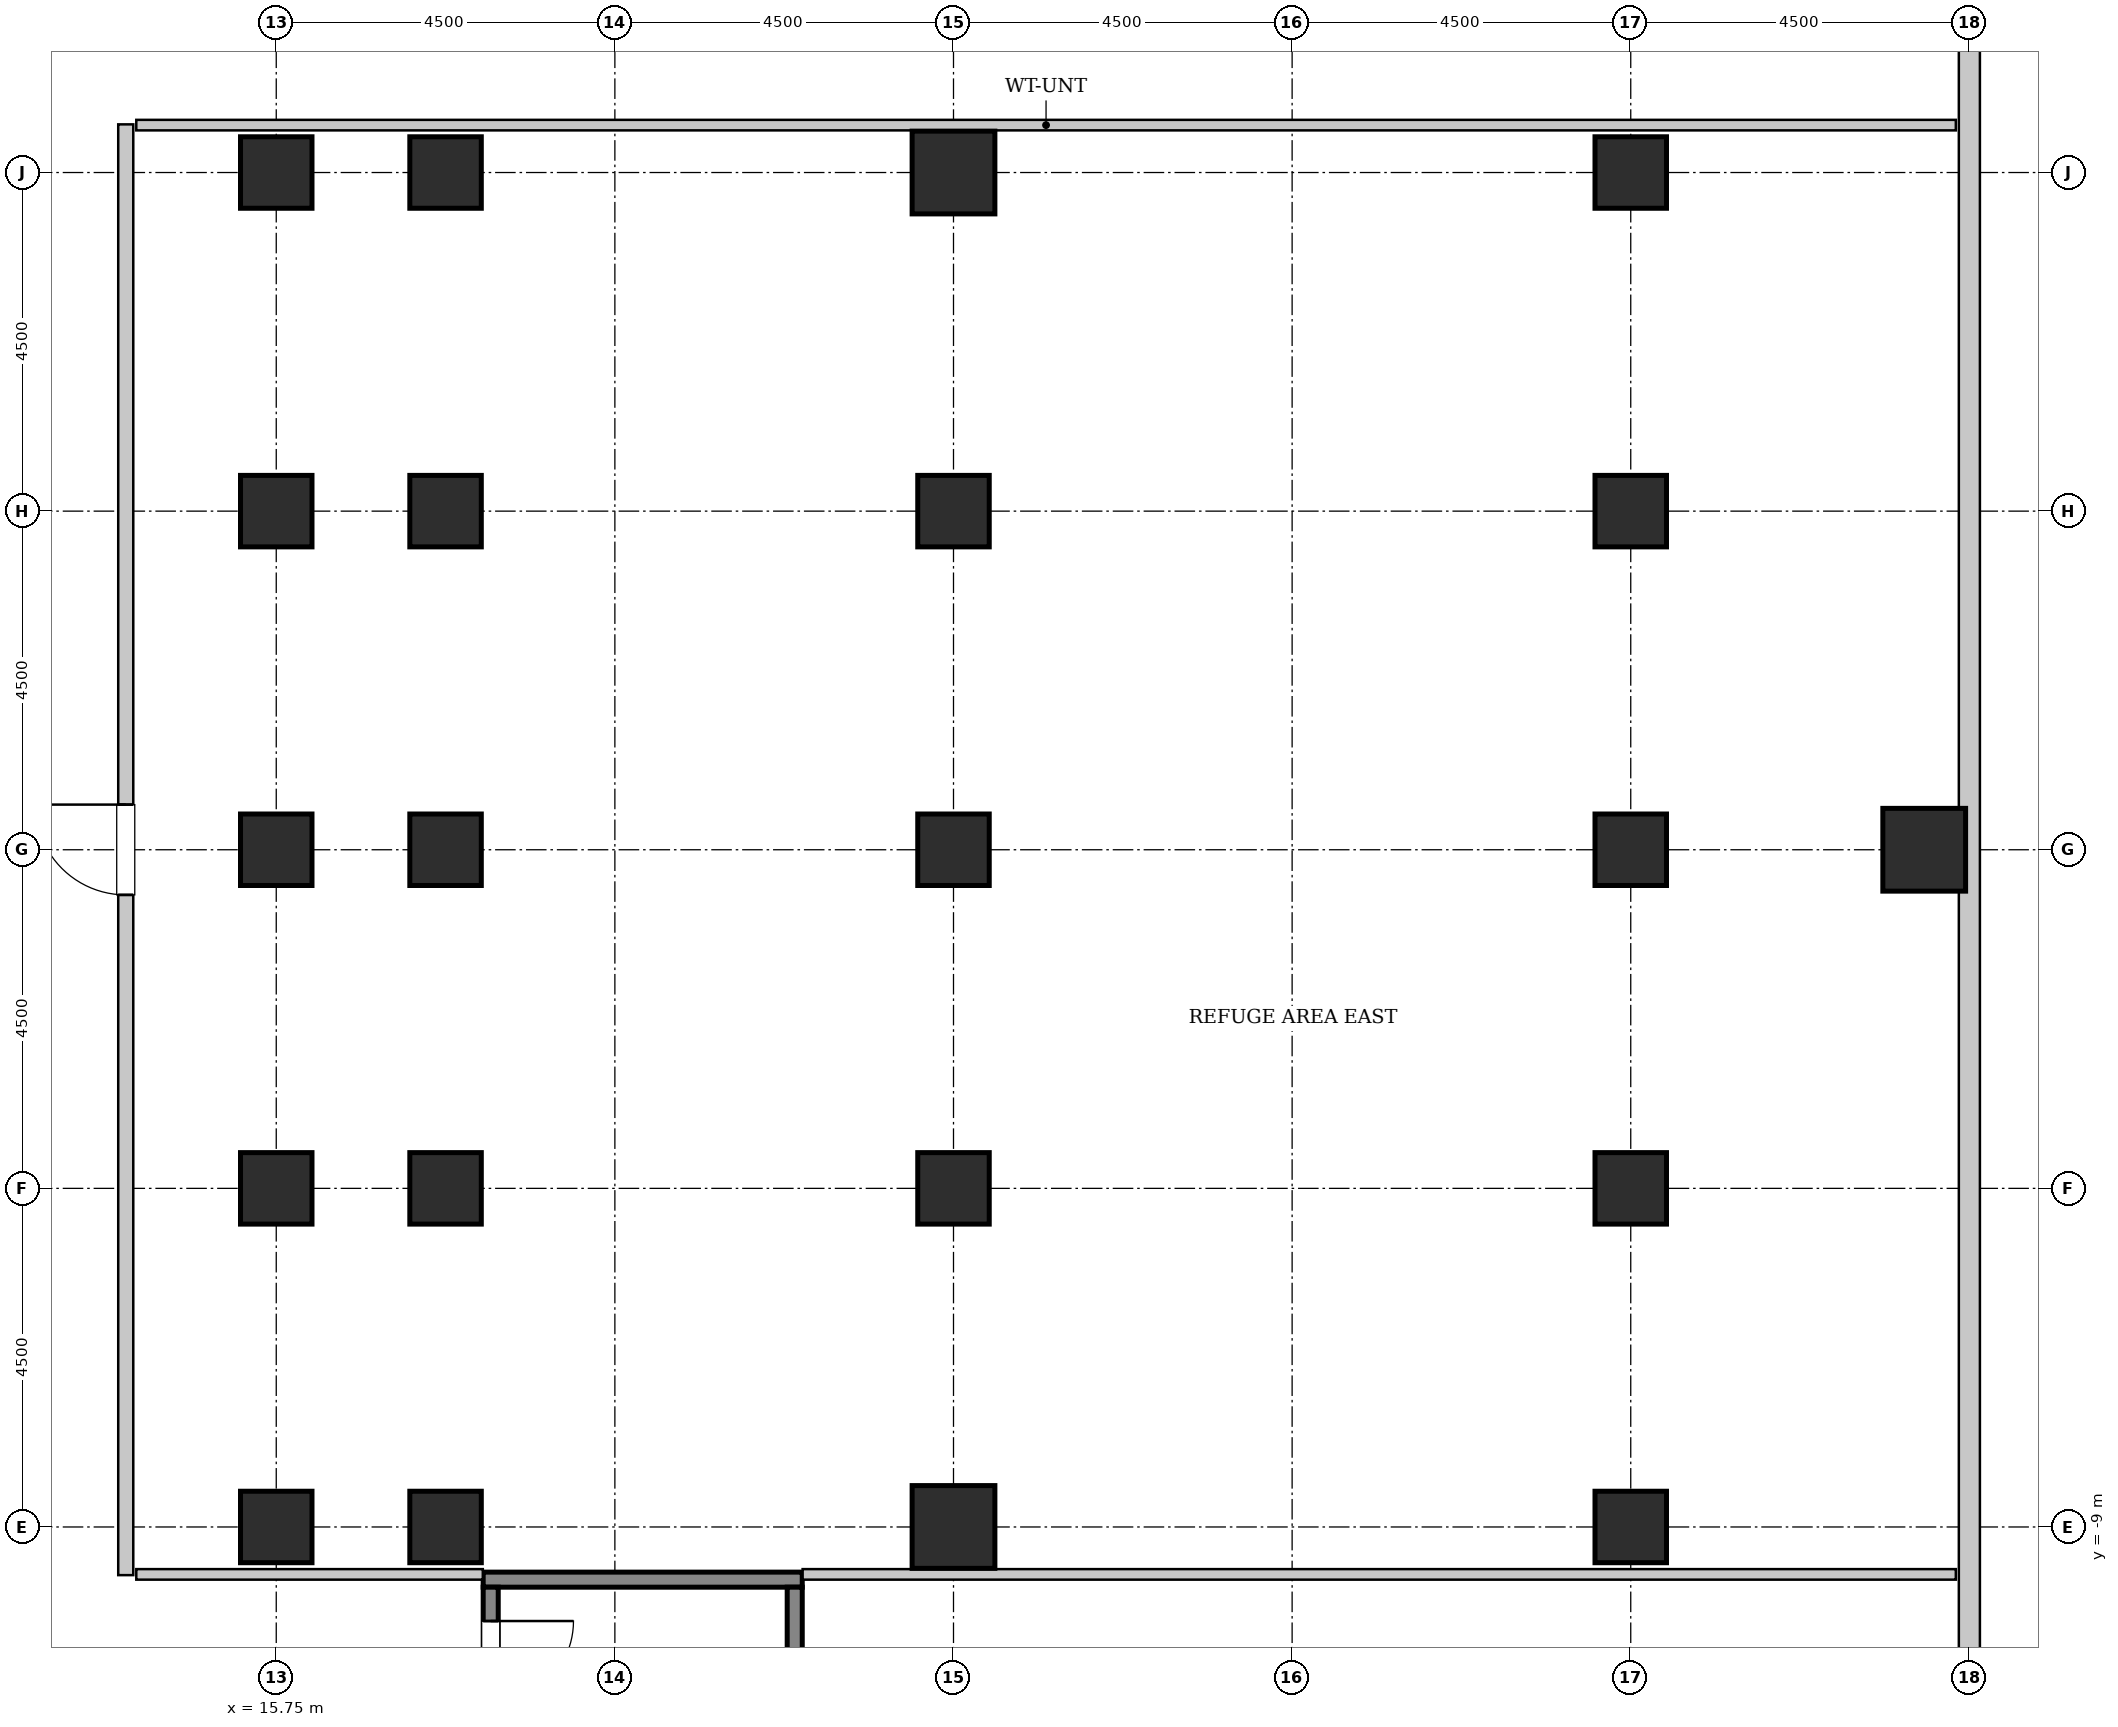
"""IFC4 building model, lengths in metres.
Left out: names, types, materials, properties, quantities, classifications, styles, units other than length and angle.
Written with IfcOpenShell. Run it as: python <this file> out.ifc"""

import sys

from ifc_helpers import new_model, si_unit, direction, frame, frame_2d, origin, origin_2d, place, context, subcontext, project, spatial, rectangle, hollow_rectangle, extrude, source, transform, mapped, element, fill, save


model = new_model("IFC4")
c1 = context("Model", 3, precision=1e-05, world=origin(), true_north=direction((0.0, 1.0)))
c2 = subcontext(c1, "Body", "Model", "MODEL_VIEW")
j1 = project(units=[si_unit("LENGTHUNIT", "METRE"), si_unit("PLANEANGLEUNIT", "RADIAN")], contexts=[c1])
p1 = place(None, origin())
s1 = spatial("IfcSite", under=j1, at=p1, CompositionType="ELEMENT")
p2 = place(p1, origin())
s2 = spatial("IfcBuilding", under=s1, at=p2, CompositionType="ELEMENT")
p3 = place(p2, frame((0.0, 0.0, 27.6)))
s3 = spatial("IfcBuildingStorey", under=s2, at=p3, CompositionType="ELEMENT", Elevation=27.6)
m1 = source(origin(), c2, "Body", "SweptSolid", [
    extrude(hollow_rectangle(XDim=1.1, YDim=1.1, WallThickness=0.055, InnerFilletRadius=0.055, OuterFilletRadius=0.11, at=origin_2d()), origin(), (0.0, 0.0, 1.0), 5.4),
])
for number, where, z_axis, x_axis in (
    (1, (24.75, -9.0, 0.0), (0.0, 0.0, 1.0), (1.0, 0.0, 0.0)),
    (2, (24.75, 9.0, 0.0), (0.0, 0.0, 1.0), (1.0, 0.0, 0.0)),
):
    element("IfcColumn", number, at=place(p3, frame(where, z_axis=z_axis, x_axis=x_axis)), inside=s3, PredefinedType="COLUMN", context=c2, shape_type="MappedRepresentation", body=[
        mapped(m1, transform((0.0, 0.0, 0.0), x_axis=(1.0, 0.0, 0.0), y_axis=(0.0, 1.0, 0.0), z_axis=(0.0, 0.0, 1.0), scale=1.0)),
    ])
m2 = source(origin(), c2, "Body", "SweptSolid", [
    extrude(hollow_rectangle(XDim=1.1, YDim=1.1, WallThickness=0.055, InnerFilletRadius=0.055, OuterFilletRadius=0.11, at=origin_2d()), origin(), (0.0, 0.0, 1.0), 5.4),
])
p4 = place(p3, frame((37.65, 0.0, 0.0), z_axis=(0.0, 0.0, 1.0), x_axis=(1.0, 0.0, 0.0)))
e3 = element("IfcColumn", 3, at=p4, inside=s3, PredefinedType="COLUMN", context=c2, shape_type="MappedRepresentation", body=[
    mapped(m2, transform((0.0, 0.0, 0.0), x_axis=(1.0, 0.0, 0.0), y_axis=(0.0, 1.0, 0.0), z_axis=(0.0, 0.0, 1.0), scale=1.0)),
])
m3 = source(origin(), c2, "Body", "SweptSolid", [
    extrude(hollow_rectangle(XDim=0.95, YDim=0.95, WallThickness=0.045, InnerFilletRadius=0.045, OuterFilletRadius=0.09, at=origin_2d()), origin(), (0.0, 0.0, 1.0), 5.4),
])
for number, where, z_axis, x_axis in (
    (4, (15.75, -9.0, 0.0), (0.0, 0.0, 1.0), (1.0, 0.0, 0.0)),
    (5, (15.75, -4.5, 0.0), (0.0, 0.0, 1.0), (1.0, 0.0, 0.0)),
    (6, (15.75, 0.0, 0.0), (0.0, 0.0, 1.0), (1.0, 0.0, 0.0)),
    (7, (15.75, 4.5, 0.0), (0.0, 0.0, 1.0), (1.0, 0.0, 0.0)),
    (8, (15.75, 9.0, 0.0), (0.0, 0.0, 1.0), (1.0, 0.0, 0.0)),
    (9, (18.0, -9.0, 0.0), (0.0, 0.0, 1.0), (1.0, 0.0, 0.0)),
    (10, (18.0, -4.5, 0.0), (0.0, 0.0, 1.0), (1.0, 0.0, 0.0)),
    (11, (18.0, 0.0, 0.0), (0.0, 0.0, 1.0), (1.0, 0.0, 0.0)),
    (12, (18.0, 4.5, 0.0), (0.0, 0.0, 1.0), (1.0, 0.0, 0.0)),
    (13, (18.0, 9.0, 0.0), (0.0, 0.0, 1.0), (1.0, 0.0, 0.0)),
    (14, (24.75, -4.5, 0.0), (0.0, 0.0, 1.0), (1.0, 0.0, 0.0)),
    (15, (24.75, 0.0, 0.0), (0.0, 0.0, 1.0), (1.0, 0.0, 0.0)),
    (16, (24.75, 4.5, 0.0), (0.0, 0.0, 1.0), (1.0, 0.0, 0.0)),
    (17, (33.75, -9.0, 0.0), (0.0, 0.0, 1.0), (1.0, 0.0, 0.0)),
    (18, (33.75, -4.5, 0.0), (0.0, 0.0, 1.0), (1.0, 0.0, 0.0)),
    (19, (33.75, 0.0, 0.0), (0.0, 0.0, 1.0), (1.0, 0.0, 0.0)),
    (20, (33.75, 4.5, 0.0), (0.0, 0.0, 1.0), (1.0, 0.0, 0.0)),
    (21, (33.75, 9.0, 0.0), (0.0, 0.0, 1.0), (1.0, 0.0, 0.0)),
):
    element("IfcColumn", number, at=place(p3, frame(where, z_axis=z_axis, x_axis=x_axis)), inside=s3, PredefinedType="COLUMN", context=c2, shape_type="MappedRepresentation", body=[
        mapped(m3, transform((0.0, 0.0, 0.0), x_axis=(1.0, 0.0, 0.0), y_axis=(0.0, 1.0, 0.0), z_axis=(0.0, 0.0, 1.0), scale=1.0)),
    ])
m4 = source(origin(), c2, "Body", "SweptSolid", [
    extrude(rectangle(XDim=50.4, YDim=0.28, at=frame_2d((25.2, 0.0))), origin(), (0.0, 0.0, 1.0), 5.15),
])
p5 = place(p3, frame((38.25, -25.2, 0.0), z_axis=(0.0, 0.0, 1.0), x_axis=(0.0, 1.0, 0.0)))
e22 = element("IfcWall", 22, at=p5, inside=s3, PredefinedType="SOLIDWALL", context=c2, shape_type="MappedRepresentation", body=[
    mapped(m4, transform((0.0, 0.0, 0.0), x_axis=(1.0, 0.0, 0.0), y_axis=(0.0, 1.0, 0.0), z_axis=(0.0, 0.0, 1.0), scale=1.0)),
])
m5 = source(origin(), c2, "Body", "SweptSolid", [
    extrude(rectangle(XDim=4.24, YDim=0.2, at=frame_2d((2.12, 0.0))), origin(), (0.0, 0.0, 1.0), 5.15),
])
p6 = place(p3, frame((18.5, -9.7, 0.0), z_axis=(0.0, 0.0, 1.0), x_axis=(1.0, 0.0, 0.0)))
e23 = element("IfcWall", 23, at=p6, inside=s3, PredefinedType="SOLIDWALL", context=c2, shape_type="MappedRepresentation", body=[
    mapped(m5, transform((0.0, 0.0, 0.0), x_axis=(1.0, 0.0, 0.0), y_axis=(0.0, 1.0, 0.0), z_axis=(0.0, 0.0, 1.0), scale=1.0)),
])
m6 = source(origin(), c2, "Body", "SweptSolid", [
    extrude(rectangle(XDim=9.0, YDim=0.2, at=frame_2d((4.5, 0.0))), origin(), (0.0, 0.0, 1.0), 5.15),
])
p7 = place(p3, frame((18.6, -9.8, 0.0), z_axis=(0.0, 0.0, 1.0), x_axis=(0.0, -1.0, 0.0)))
e24 = element("IfcWall", 24, at=p7, inside=s3, PredefinedType="SOLIDWALL", context=c2, shape_type="MappedRepresentation", body=[
    mapped(m6, transform((0.0, 0.0, 0.0), x_axis=(1.0, 0.0, 0.0), y_axis=(0.0, 1.0, 0.0), z_axis=(0.0, 0.0, 1.0), scale=1.0)),
])
p8 = place(p7, frame((0.45, 0.0, 0.0)))
e25 = element("IfcOpeningElement", 25, at=p8, cuts=e24, PredefinedType="OPENING", context=c2, shape_type="SweptSolid", body=[
    extrude(rectangle(XDim=1.1, YDim=2.15, at=frame_2d((0.55, 1.075))), frame((0.0, 0.11, 0.0), z_axis=(0.0, -1.0, 0.0), x_axis=(1.0, 0.0, 0.0)), (0.0, 0.0, 1.0), 0.22),
])
p9 = place(p3, frame((22.64, -9.8, 0.0), z_axis=(0.0, 0.0, 1.0), x_axis=(0.0, -1.0, 0.0)))
e26 = element("IfcWall", 26, at=p9, inside=s3, PredefinedType="SOLIDWALL", context=c2, shape_type="MappedRepresentation", body=[
    mapped(m6, transform((0.0, 0.0, 0.0), x_axis=(1.0, 0.0, 0.0), y_axis=(0.0, 1.0, 0.0), z_axis=(0.0, 0.0, 1.0), scale=1.0)),
])
m7 = source(origin(), c2, "Body", "SweptSolid", [
    extrude(rectangle(XDim=19.28, YDim=0.2, at=frame_2d((9.64, 0.0))), origin(), (0.0, 0.0, 1.0), 5.135),
])
p10 = place(p3, frame((13.75, -9.64, 0.0), z_axis=(0.0, 0.0, 1.0), x_axis=(0.0, 1.0, 0.0)))
e27 = element("IfcWall", 27, at=p10, inside=s3, PredefinedType="SOLIDWALL", context=c2, shape_type="MappedRepresentation", body=[
    mapped(m7, transform((0.0, 0.0, 0.0), x_axis=(1.0, 0.0, 0.0), y_axis=(0.0, 1.0, 0.0), z_axis=(0.0, 0.0, 1.0), scale=1.0)),
])
p11 = place(p10, frame((9.04, 0.0, 0.0)))
e28 = element("IfcOpeningElement", 28, at=p11, cuts=e27, PredefinedType="OPENING", context=c2, shape_type="SweptSolid", body=[
    extrude(rectangle(XDim=1.2, YDim=2.15, at=frame_2d((0.6, 1.075))), frame((0.0, 0.11, 0.0), z_axis=(0.0, -1.0, 0.0), x_axis=(1.0, 0.0, 0.0)), (0.0, 0.0, 1.0), 0.22),
])
m8 = source(origin(), c2, "Body", "SweptSolid", [
    extrude(rectangle(XDim=4.605, YDim=0.14, at=frame_2d((2.303, 0.0))), origin(), (0.0, 0.0, 1.0), 5.135),
])
p12 = place(p3, frame((13.89, -9.63, 0.0), z_axis=(0.0, 0.0, 1.0), x_axis=(1.0, 0.0, 0.0)))
e29 = element("IfcWall", 29, at=p12, inside=s3, PredefinedType="PARTITIONING", context=c2, shape_type="MappedRepresentation", body=[
    mapped(m8, transform((0.0, 0.0, 0.0), x_axis=(1.0, 0.0, 0.0), y_axis=(0.0, 1.0, 0.0), z_axis=(0.0, 0.0, 1.0), scale=1.0)),
])
m9 = source(origin(), c2, "Body", "SweptSolid", [
    extrude(rectangle(XDim=15.325, YDim=0.14, at=frame_2d((7.663, 0.0))), origin(), (0.0, 0.0, 1.0), 5.135),
])
p13 = place(p3, frame((22.745, -9.63, 0.0), z_axis=(0.0, 0.0, 1.0), x_axis=(1.0, 0.0, 0.0)))
e30 = element("IfcWall", 30, at=p13, inside=s3, PredefinedType="PARTITIONING", context=c2, shape_type="MappedRepresentation", body=[
    mapped(m9, transform((0.0, 0.0, 0.0), x_axis=(1.0, 0.0, 0.0), y_axis=(0.0, 1.0, 0.0), z_axis=(0.0, 0.0, 1.0), scale=1.0)),
])
m10 = source(origin(), c2, "Body", "SweptSolid", [
    extrude(rectangle(XDim=24.18, YDim=0.14, at=frame_2d((12.09, 0.0))), origin(), (0.0, 0.0, 1.0), 5.135),
])
p14 = place(p3, frame((13.89, 9.63, 0.0), z_axis=(0.0, 0.0, 1.0), x_axis=(1.0, 0.0, 0.0)))
e31 = element("IfcWall", 31, at=p14, inside=s3, PredefinedType="PARTITIONING", context=c2, shape_type="MappedRepresentation", body=[
    mapped(m10, transform((0.0, 0.0, 0.0), x_axis=(1.0, 0.0, 0.0), y_axis=(0.0, 1.0, 0.0), z_axis=(0.0, 0.0, 1.0), scale=1.0)),
])
m11 = source(origin(), c2, "Body", "SweptSolid", [
    extrude(rectangle(XDim=1.1, YDim=2.15, at=frame_2d((0.55, 1.075))), frame((0.0, 0.025, 0.0), z_axis=(0.0, -1.0, 0.0), x_axis=(1.0, 0.0, 0.0)), (0.0, 0.0, 1.0), 0.05),
])
p15 = place(p8, origin())
e32 = element("IfcDoor", 32, at=p15, inside=s3, OperationType="SINGLE_SWING_LEFT", PredefinedType="DOOR", context=c2, shape_type="MappedRepresentation", body=[
    mapped(m11, transform((0.0, 0.0, 0.0), x_axis=(1.0, 0.0, 0.0), y_axis=(0.0, 1.0, 0.0), z_axis=(0.0, 0.0, 1.0), scale=1.0)),
])
fill(e25, e32)
m12 = source(origin(), c2, "Body", "SweptSolid", [
    extrude(rectangle(XDim=1.2, YDim=2.15, at=frame_2d((0.6, 1.075))), frame((0.0, 0.025, 0.0), z_axis=(0.0, -1.0, 0.0), x_axis=(1.0, 0.0, 0.0)), (0.0, 0.0, 1.0), 0.05),
])
p16 = place(p11, origin())
e33 = element("IfcDoor", 33, at=p16, inside=s3, OperationType="SINGLE_SWING_RIGHT", PredefinedType="DOOR", context=c2, shape_type="MappedRepresentation", body=[
    mapped(m12, transform((0.0, 0.0, 0.0), x_axis=(1.0, 0.0, 0.0), y_axis=(0.0, 1.0, 0.0), z_axis=(0.0, 0.0, 1.0), scale=1.0)),
])
fill(e28, e33)
save(model, sys.argv[1])
